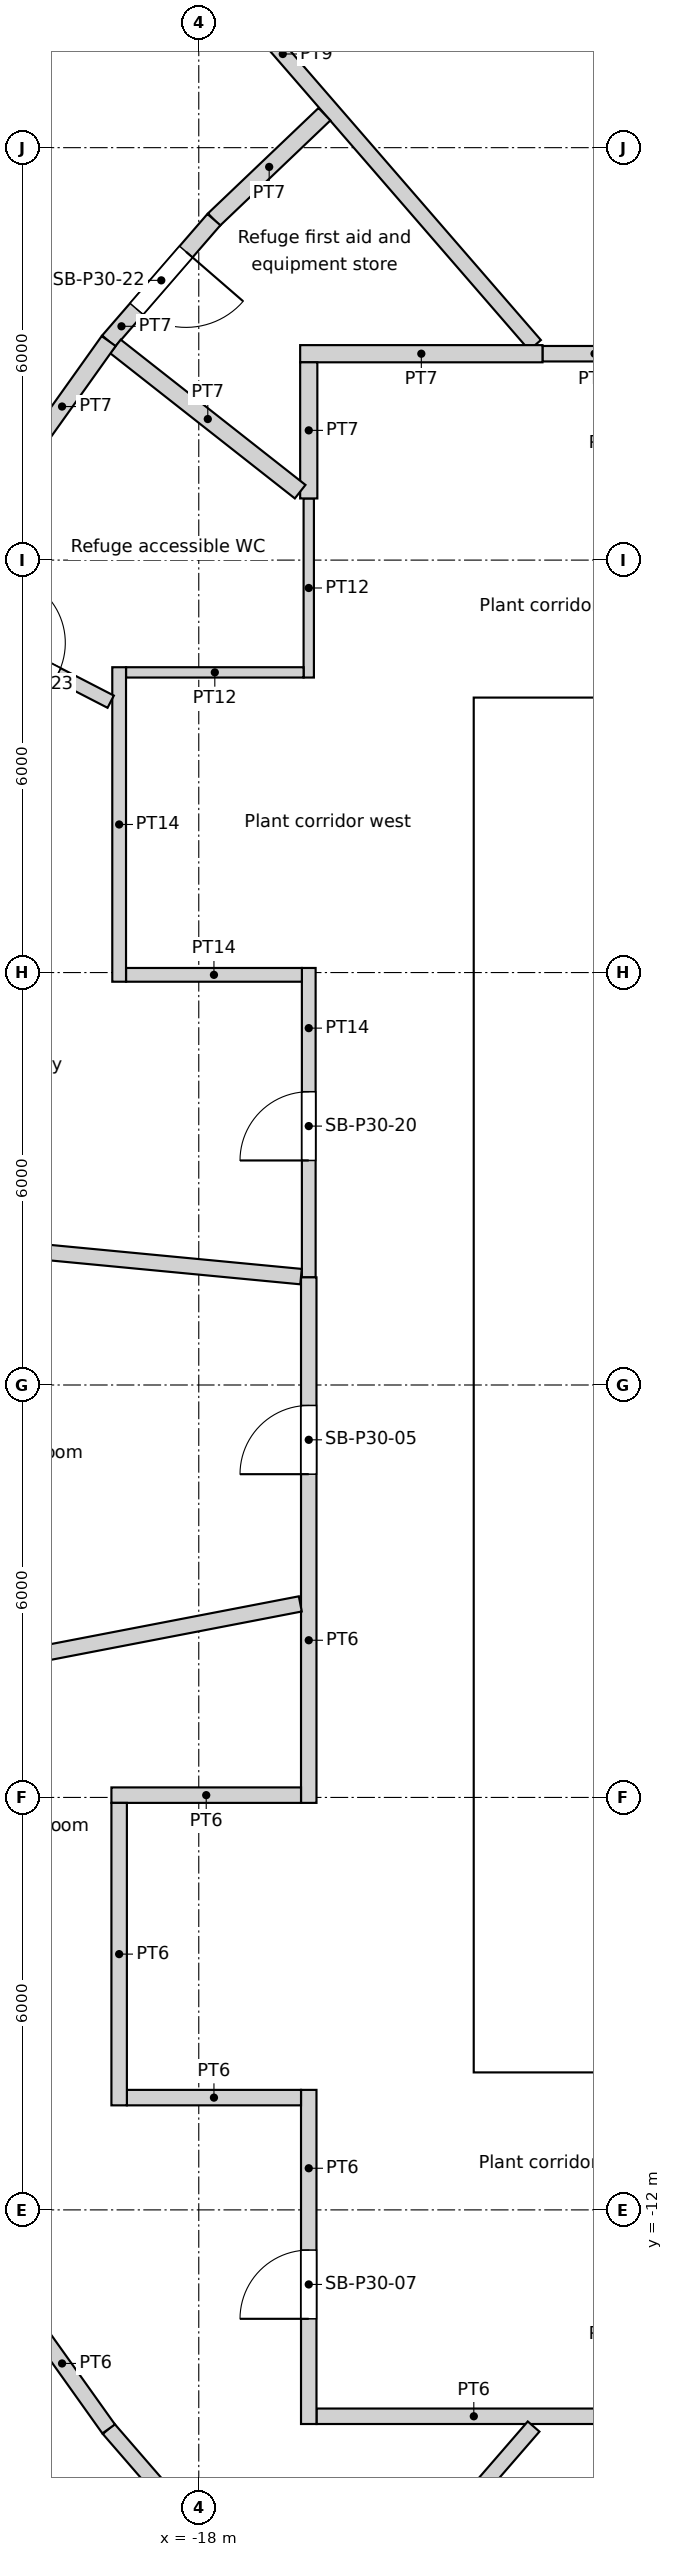
"""IFC4 building model, lengths in metres.
Left out: names, types, materials, properties, quantities, classifications, styles, units other than length and angle.
Written with IfcOpenShell. Run it as: python <this file> out.ifc"""

import sys

from ifc_helpers import new_model, si_unit, direction, frame, frame_2d, origin, origin_2d, place, context, subcontext, project, spatial, rectangle, circle, extrude, element, fill, save


model = new_model("IFC4")
c1 = context("Model", 3, precision=1e-05, world=origin(), true_north=direction((0.0, 1.0)))
c2 = subcontext(c1, "Body", "Model", "MODEL_VIEW")
j1 = project(units=[si_unit("LENGTHUNIT", "METRE"), si_unit("PLANEANGLEUNIT", "RADIAN")], contexts=[c1])
p1 = place(None, origin())
s1 = spatial("IfcSite", under=j1, at=p1, CompositionType="ELEMENT")
p2 = place(p1, origin())
s2 = spatial("IfcBuilding", under=s1, at=p2, CompositionType="ELEMENT")
p3 = place(p2, frame((0.0, 0.0, 120.0)))
s3 = spatial("IfcBuildingStorey", under=s2, at=p3, CompositionType="ELEMENT", Elevation=120.0)
for number, where, z_axis, x_axis in (
    (1, (-16.846, 17.855, 0.0), (0.0, 0.0, 1.0), (1.0, 0.0, 0.0)),
    (2, (-20.509, 13.489, 0.0), (0.0, 0.0, 1.0), (1.0, 0.0, 0.0)),
    (3, (-20.509, -13.489, 0.0), (0.0, 0.0, 1.0), (1.0, 0.0, 0.0)),
):
    element("IfcColumn", number, at=place(p3, frame(where, z_axis=z_axis, x_axis=x_axis)), inside=s3, PredefinedType="COLUMN", context=c2, shape_type="SweptSolid", body=[
        extrude(circle(Radius=0.65, at=origin_2d()), origin(), (0.0, 0.0, 1.0), 6.0),
    ])
for number, where, z_axis, x_axis in (
    (4, (-13.798, 12.802, 0.0), (0.0, 0.0, 1.0), (1.0, 0.0, 0.0)),
    (5, (-16.958, 8.167, 0.0), (0.0, 0.0, 1.0), (1.0, 0.0, 0.0)),
    (6, (-18.612, 2.805, 0.0), (0.0, 0.0, 1.0), (1.0, 0.0, 0.0)),
    (7, (-18.612, -2.805, 0.0), (0.0, 0.0, 1.0), (1.0, 0.0, 0.0)),
    (8, (-16.958, -8.167, 0.0), (0.0, 0.0, 1.0), (1.0, 0.0, 0.0)),
    (9, (-13.798, -12.802, 0.0), (0.0, 0.0, 1.0), (1.0, 0.0, 0.0)),
):
    element("IfcColumn", number, at=place(p3, frame(where, z_axis=z_axis, x_axis=x_axis)), inside=s3, PredefinedType="COLUMN", context=c2, shape_type="SweptSolid", body=[
        extrude(circle(Radius=0.7, at=origin_2d()), origin(), (0.0, 0.0, 1.0), 6.0),
    ])
p4 = place(p3, frame((-14.0, -9.4, 0.0), z_axis=(0.0, 0.0, 1.0), x_axis=(1.0, 0.0, 0.0)))
e10 = element("IfcWall", 10, at=p4, inside=s3, PredefinedType="SOLIDWALL", context=c2, shape_type="SweptSolid", body=[
    extrude(rectangle(XDim=28.0, YDim=1.2, at=frame_2d((14.0, 0.0))), origin(), (0.0, 0.0, 1.0), 5.7),
])
p5 = place(p4, frame((14.9, 0.0, 0.0)))
e11 = element("IfcOpeningElement", 11, at=p5, cuts=e10, PredefinedType="OPENING", context=c2, shape_type="SweptSolid", body=[
    extrude(rectangle(XDim=1.0, YDim=2.1, at=frame_2d((0.5, 1.05))), frame((0.0, 0.6, 0.0), z_axis=(0.0, -1.0, 0.0), x_axis=(1.0, 0.0, 0.0)), (0.0, 0.0, 1.0), 1.2),
])
p6 = place(p4, frame((9.8, 0.0, 0.0)))
e12 = element("IfcOpeningElement", 12, at=p6, cuts=e10, PredefinedType="OPENING", context=c2, shape_type="SweptSolid", body=[
    extrude(rectangle(XDim=1.8, YDim=2.1, at=frame_2d((0.9, 1.05))), frame((0.0, 0.6, 0.0), z_axis=(0.0, -1.0, 0.0), x_axis=(1.0, 0.0, 0.0)), (0.0, 0.0, 1.0), 1.2),
])
p7 = place(p4, frame((16.4, 0.0, 0.0)))
e13 = element("IfcOpeningElement", 13, at=p7, cuts=e10, PredefinedType="OPENING", context=c2, shape_type="SweptSolid", body=[
    extrude(rectangle(XDim=1.8, YDim=2.1, at=frame_2d((0.9, 1.05))), frame((0.0, 0.6, 0.0), z_axis=(0.0, -1.0, 0.0), x_axis=(1.0, 0.0, 0.0)), (0.0, 0.0, 1.0), 1.2),
])
p8 = place(p3, frame((-14.0, 9.4, 0.0), z_axis=(0.0, 0.0, 1.0), x_axis=(1.0, 0.0, 0.0)))
e14 = element("IfcWall", 14, at=p8, inside=s3, PredefinedType="SOLIDWALL", context=c2, shape_type="SweptSolid", body=[
    extrude(rectangle(XDim=28.0, YDim=1.2, at=frame_2d((14.0, 0.0))), origin(), (0.0, 0.0, 1.0), 5.7),
])
p9 = place(p8, frame((9.8, 0.0, 0.0)))
e15 = element("IfcOpeningElement", 15, at=p9, cuts=e14, PredefinedType="OPENING", context=c2, shape_type="SweptSolid", body=[
    extrude(rectangle(XDim=1.8, YDim=2.1, at=frame_2d((0.9, 1.05))), frame((0.0, 0.6, 0.0), z_axis=(0.0, -1.0, 0.0), x_axis=(1.0, 0.0, 0.0)), (0.0, 0.0, 1.0), 1.2),
])
p10 = place(p3, frame((-13.4, -8.8, 0.0), z_axis=(0.0, 0.0, 1.0), x_axis=(0.0, 1.0, 0.0)))
e16 = element("IfcWall", 16, at=p10, inside=s3, PredefinedType="SOLIDWALL", context=c2, shape_type="SweptSolid", body=[
    extrude(rectangle(XDim=17.6, YDim=1.2, at=frame_2d((8.8, 0.0))), origin(), (0.0, 0.0, 1.0), 5.7),
])
p11 = place(p10, frame((5.2, 0.0, 0.0)))
e17 = element("IfcOpeningElement", 17, at=p11, cuts=e16, PredefinedType="OPENING", context=c2, shape_type="SweptSolid", body=[
    extrude(rectangle(XDim=1.0, YDim=2.1, at=frame_2d((0.5, 1.05))), frame((0.0, 0.6, 0.0), z_axis=(0.0, -1.0, 0.0), x_axis=(1.0, 0.0, 0.0)), (0.0, 0.0, 1.0), 1.2),
])
p12 = place(p10, frame((11.4, 0.0, 0.0)))
e18 = element("IfcOpeningElement", 18, at=p12, cuts=e16, PredefinedType="OPENING", context=c2, shape_type="SweptSolid", body=[
    extrude(rectangle(XDim=1.0, YDim=2.1, at=frame_2d((0.5, 1.05))), frame((0.0, 0.6, 0.0), z_axis=(0.0, -1.0, 0.0), x_axis=(1.0, 0.0, 0.0)), (0.0, 0.0, 1.0), 1.2),
])
for number, where, z_axis, x_axis in (
    (19, (-12.2, -8.8, 0.0), (0.0, 0.0, 1.0), (0.0, 1.0, 0.0)),
    (20, (-12.2, 4.7, 0.0), (0.0, 0.0, 1.0), (0.0, 1.0, 0.0)),
):
    element("IfcWall", number, at=place(p3, frame(where, z_axis=z_axis, x_axis=x_axis)), inside=s3, PredefinedType="SOLIDWALL", context=c2, shape_type="SweptSolid", body=[
        extrude(rectangle(XDim=4.1, YDim=1.2, at=frame_2d((2.05, 0.0))), origin(), (0.0, 0.0, 1.0), 5.7),
    ])
p13 = place(p3, frame((-12.2, -1.45, 0.0), z_axis=(0.0, 0.0, 1.0), x_axis=(0.0, 1.0, 0.0)))
e21 = element("IfcWall", 21, at=p13, inside=s3, PredefinedType="SOLIDWALL", context=c2, shape_type="SweptSolid", body=[
    extrude(rectangle(XDim=2.9, YDim=1.2, at=frame_2d((1.45, 0.0))), origin(), (0.0, 0.0, 1.0), 5.7),
])
for number, where, z_axis, x_axis in (
    (22, (-12.8, -4.55, 0.0), (0.0, 0.0, 1.0), (1.0, 0.0, 0.0)),
    (23, (-12.8, 4.55, 0.0), (0.0, 0.0, 1.0), (1.0, 0.0, 0.0)),
    (24, (-12.8, -1.6, 0.0), (0.0, 0.0, 1.0), (1.0, 0.0, 0.0)),
):
    element("IfcWall", number, at=place(p3, frame(where, z_axis=z_axis, x_axis=x_axis)), inside=s3, PredefinedType="SOLIDWALL", context=c2, shape_type="SweptSolid", body=[
        extrude(rectangle(XDim=3.6, YDim=0.3, at=frame_2d((1.8, 0.0))), origin(), (0.0, 0.0, 1.0), 5.7),
    ])
p14 = place(p3, frame((-12.8, 1.6, 0.0), z_axis=(0.0, 0.0, 1.0), x_axis=(1.0, 0.0, 0.0)))
e25 = element("IfcWall", 25, at=p14, inside=s3, PredefinedType="SOLIDWALL", context=c2, shape_type="SweptSolid", body=[
    extrude(rectangle(XDim=3.6, YDim=0.3, at=frame_2d((1.8, 0.0))), origin(), (0.0, 0.0, 1.0), 5.7),
])
p15 = place(p14, frame((1.8, 0.0, 0.0)))
e26 = element("IfcOpeningElement", 26, at=p15, cuts=e25, PredefinedType="OPENING", context=c2, shape_type="SweptSolid", body=[
    extrude(rectangle(XDim=1.2, YDim=2.1, at=frame_2d((0.6, 1.05))), frame((0.0, 0.15, 0.0), z_axis=(0.0, -1.0, 0.0), x_axis=(1.0, 0.0, 0.0)), (0.0, 0.0, 1.0), 0.3),
])
p16 = place(p3, frame((-31.083, 2.968, 0.0), z_axis=(0.0, 0.0, 1.0), x_axis=(0.995471677184, -0.095058613098, 0.0)))
e27 = element("IfcWall", 27, at=p16, inside=s3, PredefinedType="PARTITIONING", context=c2, shape_type="SweptSolid", body=[
    extrude(rectangle(XDim=14.637, YDim=0.225, at=frame_2d((7.318, 0.0))), origin(), (0.0, 0.0, 1.0), 2.7),
])
p17 = place(p3, frame((-30.66, -5.909, 0.0), z_axis=(0.0, 0.0, 1.0), x_axis=(0.981928953338, 0.18924991571, 0.0)))
e28 = element("IfcWall", 28, at=p17, inside=s3, PredefinedType="PARTITIONING", context=c2, shape_type="SweptSolid", body=[
    extrude(rectangle(XDim=14.397, YDim=0.225, at=frame_2d((7.198, 0.0))), origin(), (0.0, 0.0, 1.0), 5.2),
])
p18 = place(p3, frame((-21.725, 11.2, 0.0), z_axis=(0.0, 0.0, 1.0), x_axis=(0.888871548498, -0.458156491028, 0.0)))
e29 = element("IfcWall", 29, at=p18, inside=s3, PredefinedType="PARTITIONING", context=c2, shape_type="SweptSolid", body=[
    extrude(rectangle(XDim=2.749, YDim=0.2, at=frame_2d((1.375, 0.0))), origin(), (0.0, 0.0, 1.0), 5.2),
])
p19 = place(p18, frame((0.881, 0.0, 0.0)))
e30 = element("IfcOpeningElement", 30, at=p19, cuts=e29, PredefinedType="OPENING", context=c2, shape_type="SweptSolid", body=[
    extrude(rectangle(XDim=1.0, YDim=2.1, at=frame_2d((0.5, 1.05))), frame((0.0, 0.1, 0.0), z_axis=(0.0, -1.0, 0.0), x_axis=(1.0, 0.0, 0.0)), (0.0, 0.0, 1.0), 0.2),
])
p20 = place(p3, frame((-20.667, -13.282, 0.0), z_axis=(0.0, 0.0, 1.0), x_axis=(0.580032319147, -0.814593462252, 0.0)))
e31 = element("IfcWall", 31, at=p20, inside=s3, PredefinedType="PARTITIONING", context=c2, shape_type="SweptSolid", body=[
    extrude(rectangle(XDim=2.338, YDim=0.225, at=frame_2d((1.169, 0.0))), origin(), (0.0, 0.0, 1.0), 5.2),
])
p21 = place(p3, frame((-20.448, -23.598, 0.0), z_axis=(0.0, 0.0, 1.0), x_axis=(0.654864001214, 0.755746743237, 0.0)))
e32 = element("IfcWall", 32, at=p21, inside=s3, PredefinedType="PARTITIONING", context=c2, shape_type="SweptSolid", body=[
    extrude(rectangle(XDim=11.176, YDim=0.225, at=frame_2d((5.588, 0.0))), origin(), (0.0, 0.0, 1.0), 2.7),
])
p22 = place(p3, frame((-20.448, 23.598, 0.0), z_axis=(0.0, 0.0, 1.0), x_axis=(0.654866679399, -0.755744422548, 0.0)))
e33 = element("IfcWall", 33, at=p22, inside=s3, PredefinedType="PARTITIONING", context=c2, shape_type="SweptSolid", body=[
    extrude(rectangle(XDim=11.208, YDim=0.225, at=frame_2d((5.604, 0.0))), origin(), (0.0, 0.0, 1.0), 2.7),
])
p23 = place(p3, frame((-19.311, -15.186, 0.0), z_axis=(0.0, 0.0, 1.0), x_axis=(0.654866925236, -0.755744209526, 0.0)))
e34 = element("IfcWall", 34, at=p23, inside=s3, PredefinedType="PARTITIONING", context=c2, shape_type="SweptSolid", body=[
    extrude(rectangle(XDim=2.338, YDim=0.225, at=frame_2d((1.169, 0.0))), origin(), (0.0, 0.0, 1.0), 5.2),
])
p24 = place(p3, frame((-19.311, 15.186, 0.0), z_axis=(0.0, 0.0, 1.0), x_axis=(-0.580032319147, -0.814593462252, 0.0)))
e35 = element("IfcWall", 35, at=p24, inside=s3, PredefinedType="PARTITIONING", context=c2, shape_type="SweptSolid", body=[
    extrude(rectangle(XDim=2.338, YDim=0.25, at=frame_2d((1.169, 0.0))), origin(), (0.0, 0.0, 1.0), 5.2),
])
p25 = place(p3, frame((-19.212, 15.109, 0.0), z_axis=(0.0, 0.0, 1.0), x_axis=(0.786080397648, -0.618124266174, 0.0)))
e36 = element("IfcWall", 36, at=p25, inside=s3, PredefinedType="PARTITIONING", context=c2, shape_type="SweptSolid", body=[
    extrude(rectangle(XDim=3.419, YDim=0.25, at=frame_2d((1.709, 0.0))), origin(), (0.0, 0.0, 1.0), 5.2),
])
p26 = place(p3, frame((-19.046, -10.367, 0.0), z_axis=(0.0, 0.0, 1.0), x_axis=(1.0, 0.0, 0.0)))
e37 = element("IfcWall", 37, at=p26, inside=s3, PredefinedType="PARTITIONING", context=c2, shape_type="SweptSolid", body=[
    extrude(rectangle(XDim=2.533, YDim=0.225, at=frame_2d((1.267, 0.0))), origin(), (0.0, 0.0, 1.0), 5.2),
])
p27 = place(p3, frame((-19.158, -6.079, 0.0), z_axis=(0.0, 0.0, 1.0), x_axis=(0.0, -1.0, 0.0)))
e38 = element("IfcWall", 38, at=p27, inside=s3, PredefinedType="PARTITIONING", context=c2, shape_type="SweptSolid", body=[
    extrude(rectangle(XDim=4.4, YDim=0.225, at=frame_2d((2.2, 0.0))), origin(), (0.0, 0.0, 1.0), 5.2),
])
p28 = place(p3, frame((-19.058, 5.967, 0.0), z_axis=(0.0, 0.0, 1.0), x_axis=(1.0, 0.0, 0.0)))
e39 = element("IfcWall", 39, at=p28, inside=s3, PredefinedType="PARTITIONING", context=c2, shape_type="SweptSolid", body=[
    extrude(rectangle(XDim=2.558, YDim=0.2, at=frame_2d((1.279, 0.0))), origin(), (0.0, 0.0, 1.0), 5.2),
])
p29 = place(p3, frame((-19.158, 10.442, 0.0), z_axis=(0.0, 0.0, 1.0), x_axis=(0.0, -1.0, 0.0)))
e40 = element("IfcWall", 40, at=p29, inside=s3, PredefinedType="PARTITIONING", context=c2, shape_type="SweptSolid", body=[
    extrude(rectangle(XDim=4.575, YDim=0.2, at=frame_2d((2.288, 0.0))), origin(), (0.0, 0.0, 1.0), 5.2),
])
p30 = place(p3, frame((-17.78, 16.953, 0.0), z_axis=(0.0, 0.0, 1.0), x_axis=(-0.654866925236, -0.755744209526, 0.0)))
e41 = element("IfcWall", 41, at=p30, inside=s3, PredefinedType="PARTITIONING", context=c2, shape_type="SweptSolid", body=[
    extrude(rectangle(XDim=2.338, YDim=0.25, at=frame_2d((1.169, 0.0))), origin(), (0.0, 0.0, 1.0), 5.2),
])
p31 = place(p30, frame((0.619, 0.0, 0.0)))
e42 = element("IfcOpeningElement", 42, at=p31, cuts=e41, PredefinedType="OPENING", context=c2, shape_type="SweptSolid", body=[
    extrude(rectangle(XDim=1.1, YDim=2.1, at=frame_2d((0.55, 1.05))), frame((0.0, 0.125, 0.0), z_axis=(0.0, -1.0, 0.0), x_axis=(1.0, 0.0, 0.0)), (0.0, 0.0, 1.0), 0.25),
])
p32 = place(p3, frame((-16.288, -15.002, 0.0), z_axis=(0.0, 0.0, 1.0), x_axis=(1.0, 0.0, 0.0)))
e43 = element("IfcWall", 43, at=p32, inside=s3, PredefinedType="PARTITIONING", context=c2, shape_type="SweptSolid", body=[
    extrude(rectangle(XDim=4.577, YDim=0.225, at=frame_2d((2.289, 0.0))), origin(), (0.0, 0.0, 1.0), 5.2),
])
p33 = place(p3, frame((-16.4, -10.254, 0.0), z_axis=(0.0, 0.0, 1.0), x_axis=(0.0, -1.0, 0.0)))
e44 = element("IfcWall", 44, at=p33, inside=s3, PredefinedType="PARTITIONING", context=c2, shape_type="SweptSolid", body=[
    extrude(rectangle(XDim=4.861, YDim=0.225, at=frame_2d((2.43, 0.0))), origin(), (0.0, 0.0, 1.0), 5.2),
])
p34 = place(p33, frame((2.33, 0.0, 0.0)))
e45 = element("IfcOpeningElement", 45, at=p34, cuts=e44, PredefinedType="OPENING", context=c2, shape_type="SweptSolid", body=[
    extrude(rectangle(XDim=1.0, YDim=2.1, at=frame_2d((0.5, 1.05))), frame((0.0, 0.113, 0.0), z_axis=(0.0, -1.0, 0.0), x_axis=(1.0, 0.0, 0.0)), (0.0, 0.0, 1.0), 0.225),
])
p35 = place(p3, frame((-16.512, -5.967, 0.0), z_axis=(0.0, 0.0, 1.0), x_axis=(-1.0, 0.0, 0.0)))
e46 = element("IfcWall", 46, at=p35, inside=s3, PredefinedType="PARTITIONING", context=c2, shape_type="SweptSolid", body=[
    extrude(rectangle(XDim=2.758, YDim=0.225, at=frame_2d((1.379, 0.0))), origin(), (0.0, 0.0, 1.0), 5.2),
])
p36 = place(p3, frame((-16.4, 1.566, 0.0), z_axis=(0.0, 0.0, 1.0), x_axis=(0.0, -1.0, 0.0)))
e47 = element("IfcWall", 47, at=p36, inside=s3, PredefinedType="PARTITIONING", context=c2, shape_type="SweptSolid", body=[
    extrude(rectangle(XDim=7.645, YDim=0.225, at=frame_2d((3.823, 0.0))), origin(), (0.0, 0.0, 1.0), 5.2),
])
p37 = place(p36, frame((1.863, 0.0, 0.0)))
e48 = element("IfcOpeningElement", 48, at=p37, cuts=e47, PredefinedType="OPENING", context=c2, shape_type="SweptSolid", body=[
    extrude(rectangle(XDim=1.0, YDim=2.1, at=frame_2d((0.5, 1.05))), frame((0.0, 0.113, 0.0), z_axis=(0.0, -1.0, 0.0), x_axis=(1.0, 0.0, 0.0)), (0.0, 0.0, 1.0), 0.225),
])
p38 = place(p3, frame((-16.4, 6.067, 0.0), z_axis=(0.0, 0.0, 1.0), x_axis=(0.0, -1.0, 0.0)))
e49 = element("IfcWall", 49, at=p38, inside=s3, PredefinedType="PARTITIONING", context=c2, shape_type="SweptSolid", body=[
    extrude(rectangle(XDim=4.501, YDim=0.2, at=frame_2d((2.25, 0.0))), origin(), (0.0, 0.0, 1.0), 5.2),
])
p39 = place(p38, frame((1.8, 0.0, 0.0)))
e50 = element("IfcOpeningElement", 50, at=p39, cuts=e49, PredefinedType="OPENING", context=c2, shape_type="SweptSolid", body=[
    extrude(rectangle(XDim=1.0, YDim=2.1, at=frame_2d((0.5, 1.05))), frame((0.0, 0.1, 0.0), z_axis=(0.0, -1.0, 0.0), x_axis=(1.0, 0.0, 0.0)), (0.0, 0.0, 1.0), 0.2),
])
p40 = place(p3, frame((-16.475, 10.367, 0.0), z_axis=(0.0, 0.0, 1.0), x_axis=(-1.0, 0.0, 0.0)))
e51 = element("IfcWall", 51, at=p40, inside=s3, PredefinedType="PARTITIONING", context=c2, shape_type="SweptSolid", body=[
    extrude(rectangle(XDim=2.583, YDim=0.15, at=frame_2d((1.292, 0.0))), origin(), (0.0, 0.0, 1.0), 5.2),
])
p41 = place(p3, frame((-16.4, 12.897, 0.0), z_axis=(0.0, 0.0, 1.0), x_axis=(0.0, -1.0, 0.0)))
e52 = element("IfcWall", 52, at=p41, inside=s3, PredefinedType="PARTITIONING", context=c2, shape_type="SweptSolid", body=[
    extrude(rectangle(XDim=2.606, YDim=0.15, at=frame_2d((1.303, 0.0))), origin(), (0.0, 0.0, 1.0), 5.2),
])
p42 = place(p3, frame((-16.4, 14.877, 0.0), z_axis=(0.0, 0.0, 1.0), x_axis=(0.0, -1.0, 0.0)))
e53 = element("IfcWall", 53, at=p42, inside=s3, PredefinedType="PARTITIONING", context=c2, shape_type="SweptSolid", body=[
    extrude(rectangle(XDim=1.98, YDim=0.25, at=frame_2d((0.99, 0.0))), origin(), (0.0, 0.0, 1.0), 5.2),
])
p43 = place(p3, frame((-16.171, 18.487, 0.0), z_axis=(0.0, 0.0, 1.0), x_axis=(-0.723714578036, -0.690099420039, 0.0)))
e54 = element("IfcWall", 54, at=p43, inside=s3, PredefinedType="PARTITIONING", context=c2, shape_type="SweptSolid", body=[
    extrude(rectangle(XDim=2.222, YDim=0.25, at=frame_2d((1.111, 0.0))), origin(), (0.0, 0.0, 1.0), 5.2),
])
p44 = place(p3, frame((-13.0, 15.002, 0.0), z_axis=(0.0, 0.0, 1.0), x_axis=(-1.0, 0.0, 0.0)))
e55 = element("IfcWall", 55, at=p44, inside=s3, PredefinedType="PARTITIONING", context=c2, shape_type="SweptSolid", body=[
    extrude(rectangle(XDim=3.525, YDim=0.25, at=frame_2d((1.763, 0.0))), origin(), (0.0, 0.0, 1.0), 5.2),
])
p45 = place(p3, frame((-11.485, 15.002, 0.0), z_axis=(0.0, 0.0, 1.0), x_axis=(-1.0, 0.0, 0.0)))
e56 = element("IfcWall", 56, at=p45, inside=s3, PredefinedType="PARTITIONING", context=c2, shape_type="SweptSolid", body=[
    extrude(rectangle(XDim=1.515, YDim=0.225, at=frame_2d((0.757, 0.0))), origin(), (0.0, 0.0, 1.0), 5.2),
])
p46 = place(p11, origin())
e57 = element("IfcDoor", 57, at=p46, inside=s3, OperationType="DOUBLE_DOOR_SINGLE_SWING", PredefinedType="DOOR", context=c2, shape_type="SweptSolid", body=[
    extrude(rectangle(XDim=1.0, YDim=2.1, at=frame_2d((0.5, 1.05))), frame((0.0, 0.025, 0.0), z_axis=(0.0, -1.0, 0.0), x_axis=(1.0, 0.0, 0.0)), (0.0, 0.0, 1.0), 0.05),
])
fill(e17, e57)
p47 = place(p12, origin())
e58 = element("IfcDoor", 58, at=p47, inside=s3, OperationType="DOUBLE_DOOR_SINGLE_SWING", PredefinedType="DOOR", context=c2, shape_type="SweptSolid", body=[
    extrude(rectangle(XDim=1.0, YDim=2.1, at=frame_2d((0.5, 1.05))), frame((0.0, 0.025, 0.0), z_axis=(0.0, -1.0, 0.0), x_axis=(1.0, 0.0, 0.0)), (0.0, 0.0, 1.0), 0.05),
])
fill(e18, e58)
p48 = place(p37, origin())
e59 = element("IfcDoor", 59, at=p48, inside=s3, OperationType="SINGLE_SWING_LEFT", PredefinedType="DOOR", context=c2, shape_type="SweptSolid", body=[
    extrude(rectangle(XDim=1.0, YDim=2.1, at=frame_2d((0.5, 1.05))), frame((0.0, 0.025, 0.0), z_axis=(0.0, -1.0, 0.0), x_axis=(1.0, 0.0, 0.0)), (0.0, 0.0, 1.0), 0.05),
])
fill(e48, e59)
p49 = place(p34, origin())
e60 = element("IfcDoor", 60, at=p49, inside=s3, OperationType="SINGLE_SWING_LEFT", PredefinedType="DOOR", context=c2, shape_type="SweptSolid", body=[
    extrude(rectangle(XDim=1.0, YDim=2.1, at=frame_2d((0.5, 1.05))), frame((0.0, 0.025, 0.0), z_axis=(0.0, -1.0, 0.0), x_axis=(1.0, 0.0, 0.0)), (0.0, 0.0, 1.0), 0.05),
])
fill(e45, e60)
p50 = place(p39, origin())
e61 = element("IfcDoor", 61, at=p50, inside=s3, OperationType="SINGLE_SWING_LEFT", PredefinedType="DOOR", context=c2, shape_type="SweptSolid", body=[
    extrude(rectangle(XDim=1.0, YDim=2.1, at=frame_2d((0.5, 1.05))), frame((0.0, 0.025, 0.0), z_axis=(0.0, -1.0, 0.0), x_axis=(1.0, 0.0, 0.0)), (0.0, 0.0, 1.0), 0.05),
])
fill(e50, e61)
p51 = place(p31, origin())
e62 = element("IfcDoor", 62, at=p51, inside=s3, OperationType="SINGLE_SWING_LEFT", PredefinedType="DOOR", context=c2, shape_type="SweptSolid", body=[
    extrude(rectangle(XDim=1.1, YDim=2.1, at=frame_2d((0.55, 1.05))), frame((0.0, 0.025, 0.0), z_axis=(0.0, -1.0, 0.0), x_axis=(1.0, 0.0, 0.0)), (0.0, 0.0, 1.0), 0.05),
])
fill(e42, e62)
p52 = place(p19, origin())
e63 = element("IfcDoor", 63, at=p52, inside=s3, OperationType="SINGLE_SWING_LEFT", PredefinedType="DOOR", context=c2, shape_type="SweptSolid", body=[
    extrude(rectangle(XDim=1.0, YDim=2.1, at=frame_2d((0.5, 1.05))), frame((0.0, 0.025, 0.0), z_axis=(0.0, -1.0, 0.0), x_axis=(1.0, 0.0, 0.0)), (0.0, 0.0, 1.0), 0.05),
])
fill(e30, e63)
save(model, sys.argv[1])
